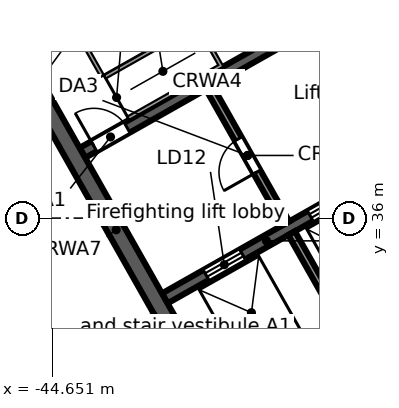
"""IFC4 building model, lengths in metres.
Left out: names, types, materials, properties, quantities, classifications, styles, units other than length and angle.
Written with IfcOpenShell. Run it as: python <this file> out.ifc"""

import sys

from ifc_helpers import new_model, si_unit, direction, frame, frame_2d, origin, place, context, subcontext, project, spatial, rectangle, extrude, element, fill, save


model = new_model("IFC4")
c1 = context("Model", 3, precision=1e-05, world=origin(), true_north=direction((0.0, 1.0)))
c2 = subcontext(c1, "Body", "Model", "MODEL_VIEW")
j1 = project(units=[si_unit("LENGTHUNIT", "METRE"), si_unit("PLANEANGLEUNIT", "RADIAN")], contexts=[c1])
p1 = place(None, origin())
s1 = spatial("IfcSite", under=j1, at=p1, CompositionType="ELEMENT")
p2 = place(p1, origin())
s2 = spatial("IfcBuilding", under=s1, at=p2, CompositionType="ELEMENT")
p3 = place(p2, frame((0.0, 0.0, 227.0)))
s3 = spatial("IfcBuildingStorey", under=s2, at=p3, CompositionType="ELEMENT", Elevation=227.0)
p4 = place(p3, frame((-0.046, 47.974, 0.0), z_axis=(0.0, 0.0, 1.0), x_axis=(-0.870356579543, -0.492421998337, 0.0)))
e1 = element("IfcWall", 1, at=p4, inside=s3, PredefinedType="STANDARD", context=c2, shape_type="SweptSolid", body=[
    extrude(rectangle(XDim=43.754, YDim=0.25, at=frame_2d((21.877, 0.0))), origin(), (0.0, 0.0, 1.0), 3.55),
])
p5 = place(p4, frame((41.061, 0.0, 0.8)))
e2 = element("IfcOpeningElement", 2, at=p5, cuts=e1, PredefinedType="OPENING", context=c2, shape_type="SweptSolid", body=[
    extrude(rectangle(XDim=2.4, YDim=2.2, at=frame_2d((1.2, 1.1))), frame((0.0, 0.135, 0.0), z_axis=(0.0, -1.0, 0.0), x_axis=(1.0, 0.0, 0.0)), (0.0, 0.0, 1.0), 0.27),
])
p6 = place(p4, frame((38.443, 0.0, 0.0)))
e3 = element("IfcOpeningElement", 3, at=p6, cuts=e1, PredefinedType="OPENING", context=c2, shape_type="SweptSolid", body=[
    extrude(rectangle(XDim=1.8, YDim=2.4, at=frame_2d((0.9, 1.2))), frame((0.0, 0.135, 0.0), z_axis=(0.0, -1.0, 0.0), x_axis=(1.0, 0.0, 0.0)), (0.0, 0.0, 1.0), 0.27),
])
p7 = place(p4, frame((35.225, 0.0, 0.8)))
e4 = element("IfcOpeningElement", 4, at=p7, cuts=e1, PredefinedType="OPENING", context=c2, shape_type="SweptSolid", body=[
    extrude(rectangle(XDim=2.4, YDim=2.2, at=frame_2d((1.2, 1.1))), frame((0.0, 0.135, 0.0), z_axis=(0.0, -1.0, 0.0), x_axis=(1.0, 0.0, 0.0)), (0.0, 0.0, 1.0), 0.27),
])
p8 = place(p4, frame((32.307, 0.0, 0.8)))
e5 = element("IfcOpeningElement", 5, at=p8, cuts=e1, PredefinedType="OPENING", context=c2, shape_type="SweptSolid", body=[
    extrude(rectangle(XDim=2.4, YDim=2.2, at=frame_2d((1.2, 1.1))), frame((0.0, 0.135, 0.0), z_axis=(0.0, -1.0, 0.0), x_axis=(1.0, 0.0, 0.0)), (0.0, 0.0, 1.0), 0.27),
])
p9 = place(p4, frame((29.688, 0.0, 0.0)))
e6 = element("IfcOpeningElement", 6, at=p9, cuts=e1, PredefinedType="OPENING", context=c2, shape_type="SweptSolid", body=[
    extrude(rectangle(XDim=1.8, YDim=2.4, at=frame_2d((0.9, 1.2))), frame((0.0, 0.135, 0.0), z_axis=(0.0, -1.0, 0.0), x_axis=(1.0, 0.0, 0.0)), (0.0, 0.0, 1.0), 0.27),
])
p10 = place(p4, frame((26.47, 0.0, 0.8)))
e7 = element("IfcOpeningElement", 7, at=p10, cuts=e1, PredefinedType="OPENING", context=c2, shape_type="SweptSolid", body=[
    extrude(rectangle(XDim=2.4, YDim=2.2, at=frame_2d((1.2, 1.1))), frame((0.0, 0.135, 0.0), z_axis=(0.0, -1.0, 0.0), x_axis=(1.0, 0.0, 0.0)), (0.0, 0.0, 1.0), 0.27),
])
p11 = place(p4, frame((23.552, 0.0, 0.8)))
e8 = element("IfcOpeningElement", 8, at=p11, cuts=e1, PredefinedType="OPENING", context=c2, shape_type="SweptSolid", body=[
    extrude(rectangle(XDim=2.4, YDim=2.2, at=frame_2d((1.2, 1.1))), frame((0.0, 0.135, 0.0), z_axis=(0.0, -1.0, 0.0), x_axis=(1.0, 0.0, 0.0)), (0.0, 0.0, 1.0), 0.27),
])
p12 = place(p4, frame((20.934, 0.0, 0.0)))
e9 = element("IfcOpeningElement", 9, at=p12, cuts=e1, PredefinedType="OPENING", context=c2, shape_type="SweptSolid", body=[
    extrude(rectangle(XDim=1.8, YDim=2.4, at=frame_2d((0.9, 1.2))), frame((0.0, 0.135, 0.0), z_axis=(0.0, -1.0, 0.0), x_axis=(1.0, 0.0, 0.0)), (0.0, 0.0, 1.0), 0.27),
])
p13 = place(p4, frame((17.716, 0.0, 0.8)))
e10 = element("IfcOpeningElement", 10, at=p13, cuts=e1, PredefinedType="OPENING", context=c2, shape_type="SweptSolid", body=[
    extrude(rectangle(XDim=2.4, YDim=2.2, at=frame_2d((1.2, 1.1))), frame((0.0, 0.135, 0.0), z_axis=(0.0, -1.0, 0.0), x_axis=(1.0, 0.0, 0.0)), (0.0, 0.0, 1.0), 0.27),
])
p14 = place(p4, frame((14.798, 0.0, 0.8)))
e11 = element("IfcOpeningElement", 11, at=p14, cuts=e1, PredefinedType="OPENING", context=c2, shape_type="SweptSolid", body=[
    extrude(rectangle(XDim=2.4, YDim=2.2, at=frame_2d((1.2, 1.1))), frame((0.0, 0.135, 0.0), z_axis=(0.0, -1.0, 0.0), x_axis=(1.0, 0.0, 0.0)), (0.0, 0.0, 1.0), 0.27),
])
p15 = place(p4, frame((12.179, 0.0, 0.0)))
e12 = element("IfcOpeningElement", 12, at=p15, cuts=e1, PredefinedType="OPENING", context=c2, shape_type="SweptSolid", body=[
    extrude(rectangle(XDim=1.8, YDim=2.4, at=frame_2d((0.9, 1.2))), frame((0.0, 0.135, 0.0), z_axis=(0.0, -1.0, 0.0), x_axis=(1.0, 0.0, 0.0)), (0.0, 0.0, 1.0), 0.27),
])
p16 = place(p4, frame((8.961, 0.0, 0.8)))
e13 = element("IfcOpeningElement", 13, at=p16, cuts=e1, PredefinedType="OPENING", context=c2, shape_type="SweptSolid", body=[
    extrude(rectangle(XDim=2.4, YDim=2.2, at=frame_2d((1.2, 1.1))), frame((0.0, 0.135, 0.0), z_axis=(0.0, -1.0, 0.0), x_axis=(1.0, 0.0, 0.0)), (0.0, 0.0, 1.0), 0.27),
])
p17 = place(p4, frame((6.043, 0.0, 0.8)))
e14 = element("IfcOpeningElement", 14, at=p17, cuts=e1, PredefinedType="OPENING", context=c2, shape_type="SweptSolid", body=[
    extrude(rectangle(XDim=2.4, YDim=2.2, at=frame_2d((1.2, 1.1))), frame((0.0, 0.135, 0.0), z_axis=(0.0, -1.0, 0.0), x_axis=(1.0, 0.0, 0.0)), (0.0, 0.0, 1.0), 0.27),
])
p18 = place(p4, frame((3.425, 0.0, 0.0)))
e15 = element("IfcOpeningElement", 15, at=p18, cuts=e1, PredefinedType="OPENING", context=c2, shape_type="SweptSolid", body=[
    extrude(rectangle(XDim=1.8, YDim=2.4, at=frame_2d((0.9, 1.2))), frame((0.0, 0.135, 0.0), z_axis=(0.0, -1.0, 0.0), x_axis=(1.0, 0.0, 0.0)), (0.0, 0.0, 1.0), 0.27),
])
p19 = place(p4, frame((0.207, 0.0, 0.8)))
e16 = element("IfcOpeningElement", 16, at=p19, cuts=e1, PredefinedType="OPENING", context=c2, shape_type="SweptSolid", body=[
    extrude(rectangle(XDim=2.4, YDim=2.2, at=frame_2d((1.2, 1.1))), frame((0.0, 0.135, 0.0), z_axis=(0.0, -1.0, 0.0), x_axis=(1.0, 0.0, 0.0)), (0.0, 0.0, 1.0), 0.27),
])
p20 = place(p3, frame((-58.732, 38.771, 0.0), z_axis=(0.0, 0.0, 1.0), x_axis=(0.870354824205, 0.492425100887, 0.0)))
e17 = element("IfcWall", 17, at=p20, inside=s3, PredefinedType="STANDARD", context=c2, shape_type="SweptSolid", body=[
    extrude(rectangle(XDim=64.006, YDim=0.25, at=frame_2d((32.003, 0.0))), origin(), (0.0, 0.0, 1.0), 3.55),
])
p21 = place(p20, frame((61.259, 0.0, 0.8)))
e18 = element("IfcOpeningElement", 18, at=p21, cuts=e17, PredefinedType="OPENING", context=c2, shape_type="SweptSolid", body=[
    extrude(rectangle(XDim=2.4, YDim=2.2, at=frame_2d((1.2, 1.1))), frame((0.0, 0.135, 0.0), z_axis=(0.0, -1.0, 0.0), x_axis=(1.0, 0.0, 0.0)), (0.0, 0.0, 1.0), 0.27),
])
p22 = place(p20, frame((58.216, 0.0, 0.8)))
e19 = element("IfcOpeningElement", 19, at=p22, cuts=e17, PredefinedType="OPENING", context=c2, shape_type="SweptSolid", body=[
    extrude(rectangle(XDim=2.4, YDim=2.2, at=frame_2d((1.2, 1.1))), frame((0.0, 0.135, 0.0), z_axis=(0.0, -1.0, 0.0), x_axis=(1.0, 0.0, 0.0)), (0.0, 0.0, 1.0), 0.27),
])
p23 = place(p20, frame((55.173, 0.0, 0.8)))
e20 = element("IfcOpeningElement", 20, at=p23, cuts=e17, PredefinedType="OPENING", context=c2, shape_type="SweptSolid", body=[
    extrude(rectangle(XDim=2.4, YDim=2.2, at=frame_2d((1.2, 1.1))), frame((0.0, 0.135, 0.0), z_axis=(0.0, -1.0, 0.0), x_axis=(1.0, 0.0, 0.0)), (0.0, 0.0, 1.0), 0.27),
])
p24 = place(p20, frame((52.129, 0.0, 0.8)))
e21 = element("IfcOpeningElement", 21, at=p24, cuts=e17, PredefinedType="OPENING", context=c2, shape_type="SweptSolid", body=[
    extrude(rectangle(XDim=2.4, YDim=2.2, at=frame_2d((1.2, 1.1))), frame((0.0, 0.135, 0.0), z_axis=(0.0, -1.0, 0.0), x_axis=(1.0, 0.0, 0.0)), (0.0, 0.0, 1.0), 0.27),
])
p25 = place(p20, frame((49.086, 0.0, 0.8)))
e22 = element("IfcOpeningElement", 22, at=p25, cuts=e17, PredefinedType="OPENING", context=c2, shape_type="SweptSolid", body=[
    extrude(rectangle(XDim=2.4, YDim=2.2, at=frame_2d((1.2, 1.1))), frame((0.0, 0.135, 0.0), z_axis=(0.0, -1.0, 0.0), x_axis=(1.0, 0.0, 0.0)), (0.0, 0.0, 1.0), 0.27),
])
p26 = place(p20, frame((46.043, 0.0, 0.8)))
e23 = element("IfcOpeningElement", 23, at=p26, cuts=e17, PredefinedType="OPENING", context=c2, shape_type="SweptSolid", body=[
    extrude(rectangle(XDim=2.4, YDim=2.2, at=frame_2d((1.2, 1.1))), frame((0.0, 0.135, 0.0), z_axis=(0.0, -1.0, 0.0), x_axis=(1.0, 0.0, 0.0)), (0.0, 0.0, 1.0), 0.27),
])
p27 = place(p20, frame((43.0, 0.0, 0.8)))
e24 = element("IfcOpeningElement", 24, at=p27, cuts=e17, PredefinedType="OPENING", context=c2, shape_type="SweptSolid", body=[
    extrude(rectangle(XDim=2.4, YDim=2.2, at=frame_2d((1.2, 1.1))), frame((0.0, 0.135, 0.0), z_axis=(0.0, -1.0, 0.0), x_axis=(1.0, 0.0, 0.0)), (0.0, 0.0, 1.0), 0.27),
])
p28 = place(p20, frame((39.956, 0.0, 0.8)))
e25 = element("IfcOpeningElement", 25, at=p28, cuts=e17, PredefinedType="OPENING", context=c2, shape_type="SweptSolid", body=[
    extrude(rectangle(XDim=2.4, YDim=2.2, at=frame_2d((1.2, 1.1))), frame((0.0, 0.135, 0.0), z_axis=(0.0, -1.0, 0.0), x_axis=(1.0, 0.0, 0.0)), (0.0, 0.0, 1.0), 0.27),
])
p29 = place(p20, frame((36.913, 0.0, 0.8)))
e26 = element("IfcOpeningElement", 26, at=p29, cuts=e17, PredefinedType="OPENING", context=c2, shape_type="SweptSolid", body=[
    extrude(rectangle(XDim=2.4, YDim=2.2, at=frame_2d((1.2, 1.1))), frame((0.0, 0.135, 0.0), z_axis=(0.0, -1.0, 0.0), x_axis=(1.0, 0.0, 0.0)), (0.0, 0.0, 1.0), 0.27),
])
p30 = place(p20, frame((33.87, 0.0, 0.8)))
e27 = element("IfcOpeningElement", 27, at=p30, cuts=e17, PredefinedType="OPENING", context=c2, shape_type="SweptSolid", body=[
    extrude(rectangle(XDim=2.4, YDim=2.2, at=frame_2d((1.2, 1.1))), frame((0.0, 0.135, 0.0), z_axis=(0.0, -1.0, 0.0), x_axis=(1.0, 0.0, 0.0)), (0.0, 0.0, 1.0), 0.27),
])
p31 = place(p20, frame((30.826, 0.0, 0.8)))
e28 = element("IfcOpeningElement", 28, at=p31, cuts=e17, PredefinedType="OPENING", context=c2, shape_type="SweptSolid", body=[
    extrude(rectangle(XDim=2.4, YDim=2.2, at=frame_2d((1.2, 1.1))), frame((0.0, 0.135, 0.0), z_axis=(0.0, -1.0, 0.0), x_axis=(1.0, 0.0, 0.0)), (0.0, 0.0, 1.0), 0.27),
])
p32 = place(p20, frame((27.783, 0.0, 0.8)))
e29 = element("IfcOpeningElement", 29, at=p32, cuts=e17, PredefinedType="OPENING", context=c2, shape_type="SweptSolid", body=[
    extrude(rectangle(XDim=2.4, YDim=2.2, at=frame_2d((1.2, 1.1))), frame((0.0, 0.135, 0.0), z_axis=(0.0, -1.0, 0.0), x_axis=(1.0, 0.0, 0.0)), (0.0, 0.0, 1.0), 0.27),
])
p33 = place(p20, frame((24.74, 0.0, 0.8)))
e30 = element("IfcOpeningElement", 30, at=p33, cuts=e17, PredefinedType="OPENING", context=c2, shape_type="SweptSolid", body=[
    extrude(rectangle(XDim=2.4, YDim=2.2, at=frame_2d((1.2, 1.1))), frame((0.0, 0.135, 0.0), z_axis=(0.0, -1.0, 0.0), x_axis=(1.0, 0.0, 0.0)), (0.0, 0.0, 1.0), 0.27),
])
p34 = place(p20, frame((21.696, 0.0, 0.8)))
e31 = element("IfcOpeningElement", 31, at=p34, cuts=e17, PredefinedType="OPENING", context=c2, shape_type="SweptSolid", body=[
    extrude(rectangle(XDim=2.4, YDim=2.2, at=frame_2d((1.2, 1.1))), frame((0.0, 0.135, 0.0), z_axis=(0.0, -1.0, 0.0), x_axis=(1.0, 0.0, 0.0)), (0.0, 0.0, 1.0), 0.27),
])
p35 = place(p20, frame((18.653, 0.0, 0.8)))
e32 = element("IfcOpeningElement", 32, at=p35, cuts=e17, PredefinedType="OPENING", context=c2, shape_type="SweptSolid", body=[
    extrude(rectangle(XDim=2.4, YDim=2.2, at=frame_2d((1.2, 1.1))), frame((0.0, 0.135, 0.0), z_axis=(0.0, -1.0, 0.0), x_axis=(1.0, 0.0, 0.0)), (0.0, 0.0, 1.0), 0.27),
])
p36 = place(p20, frame((15.61, 0.0, 0.8)))
e33 = element("IfcOpeningElement", 33, at=p36, cuts=e17, PredefinedType="OPENING", context=c2, shape_type="SweptSolid", body=[
    extrude(rectangle(XDim=2.4, YDim=2.2, at=frame_2d((1.2, 1.1))), frame((0.0, 0.135, 0.0), z_axis=(0.0, -1.0, 0.0), x_axis=(1.0, 0.0, 0.0)), (0.0, 0.0, 1.0), 0.27),
])
p37 = place(p20, frame((12.567, 0.0, 0.8)))
e34 = element("IfcOpeningElement", 34, at=p37, cuts=e17, PredefinedType="OPENING", context=c2, shape_type="SweptSolid", body=[
    extrude(rectangle(XDim=2.4, YDim=2.2, at=frame_2d((1.2, 1.1))), frame((0.0, 0.135, 0.0), z_axis=(0.0, -1.0, 0.0), x_axis=(1.0, 0.0, 0.0)), (0.0, 0.0, 1.0), 0.27),
])
p38 = place(p20, frame((9.523, 0.0, 0.8)))
e35 = element("IfcOpeningElement", 35, at=p38, cuts=e17, PredefinedType="OPENING", context=c2, shape_type="SweptSolid", body=[
    extrude(rectangle(XDim=2.4, YDim=2.2, at=frame_2d((1.2, 1.1))), frame((0.0, 0.135, 0.0), z_axis=(0.0, -1.0, 0.0), x_axis=(1.0, 0.0, 0.0)), (0.0, 0.0, 1.0), 0.27),
])
p39 = place(p20, frame((6.48, 0.0, 0.8)))
e36 = element("IfcOpeningElement", 36, at=p39, cuts=e17, PredefinedType="OPENING", context=c2, shape_type="SweptSolid", body=[
    extrude(rectangle(XDim=2.4, YDim=2.2, at=frame_2d((1.2, 1.1))), frame((0.0, 0.135, 0.0), z_axis=(0.0, -1.0, 0.0), x_axis=(1.0, 0.0, 0.0)), (0.0, 0.0, 1.0), 0.27),
])
p40 = place(p20, frame((3.437, 0.0, 0.8)))
e37 = element("IfcOpeningElement", 37, at=p40, cuts=e17, PredefinedType="OPENING", context=c2, shape_type="SweptSolid", body=[
    extrude(rectangle(XDim=2.4, YDim=2.2, at=frame_2d((1.2, 1.1))), frame((0.0, 0.135, 0.0), z_axis=(0.0, -1.0, 0.0), x_axis=(1.0, 0.0, 0.0)), (0.0, 0.0, 1.0), 0.27),
])
p41 = place(p20, frame((0.393, 0.0, 0.8)))
e38 = element("IfcOpeningElement", 38, at=p41, cuts=e17, PredefinedType="OPENING", context=c2, shape_type="SweptSolid", body=[
    extrude(rectangle(XDim=2.4, YDim=2.2, at=frame_2d((1.2, 1.1))), frame((0.0, 0.135, 0.0), z_axis=(0.0, -1.0, 0.0), x_axis=(1.0, 0.0, 0.0)), (0.0, 0.0, 1.0), 0.27),
])
p42 = place(p3, frame((-44.115, 26.507, 0.0), z_axis=(0.0, 0.0, 1.0), x_axis=(-0.857166583633, 0.515039268311, 0.0)))
e39 = element("IfcWall", 39, at=p42, inside=s3, PredefinedType="STANDARD", context=c2, shape_type="SweptSolid", body=[
    extrude(rectangle(XDim=17.106, YDim=0.25, at=frame_2d((8.553, 0.0))), origin(), (0.0, 0.0, 1.0), 3.55),
])
p43 = place(p42, frame((14.417, 0.0, 0.8)))
e40 = element("IfcOpeningElement", 40, at=p43, cuts=e39, PredefinedType="OPENING", context=c2, shape_type="SweptSolid", body=[
    extrude(rectangle(XDim=2.4, YDim=2.2, at=frame_2d((1.2, 1.1))), frame((0.0, 0.135, 0.0), z_axis=(0.0, -1.0, 0.0), x_axis=(1.0, 0.0, 0.0)), (0.0, 0.0, 1.0), 0.27),
])
p44 = place(p42, frame((11.584, 0.0, 0.8)))
e41 = element("IfcOpeningElement", 41, at=p44, cuts=e39, PredefinedType="OPENING", context=c2, shape_type="SweptSolid", body=[
    extrude(rectangle(XDim=2.4, YDim=2.2, at=frame_2d((1.2, 1.1))), frame((0.0, 0.135, 0.0), z_axis=(0.0, -1.0, 0.0), x_axis=(1.0, 0.0, 0.0)), (0.0, 0.0, 1.0), 0.27),
])
p45 = place(p42, frame((8.75, 0.0, 0.8)))
e42 = element("IfcOpeningElement", 42, at=p45, cuts=e39, PredefinedType="OPENING", context=c2, shape_type="SweptSolid", body=[
    extrude(rectangle(XDim=2.4, YDim=2.2, at=frame_2d((1.2, 1.1))), frame((0.0, 0.135, 0.0), z_axis=(0.0, -1.0, 0.0), x_axis=(1.0, 0.0, 0.0)), (0.0, 0.0, 1.0), 0.27),
])
p46 = place(p42, frame((5.917, 0.0, 0.8)))
e43 = element("IfcOpeningElement", 43, at=p46, cuts=e39, PredefinedType="OPENING", context=c2, shape_type="SweptSolid", body=[
    extrude(rectangle(XDim=2.4, YDim=2.2, at=frame_2d((1.2, 1.1))), frame((0.0, 0.135, 0.0), z_axis=(0.0, -1.0, 0.0), x_axis=(1.0, 0.0, 0.0)), (0.0, 0.0, 1.0), 0.27),
])
p47 = place(p42, frame((3.084, 0.0, 0.8)))
e44 = element("IfcOpeningElement", 44, at=p47, cuts=e39, PredefinedType="OPENING", context=c2, shape_type="SweptSolid", body=[
    extrude(rectangle(XDim=2.4, YDim=2.2, at=frame_2d((1.2, 1.1))), frame((0.0, 0.135, 0.0), z_axis=(0.0, -1.0, 0.0), x_axis=(1.0, 0.0, 0.0)), (0.0, 0.0, 1.0), 0.27),
])
p48 = place(p42, frame((0.25, 0.0, 0.8)))
e45 = element("IfcOpeningElement", 45, at=p48, cuts=e39, PredefinedType="OPENING", context=c2, shape_type="SweptSolid", body=[
    extrude(rectangle(XDim=2.4, YDim=2.2, at=frame_2d((1.2, 1.1))), frame((0.0, 0.135, 0.0), z_axis=(0.0, -1.0, 0.0), x_axis=(1.0, 0.0, 0.0)), (0.0, 0.0, 1.0), 0.27),
])
p49 = place(p3, frame((-39.825, 29.684, 0.0), z_axis=(0.0, 0.0, 1.0), x_axis=(0.870353598469, 0.492427267353, 0.0)))
e46 = element("IfcWall", 46, at=p49, inside=s3, PredefinedType="SOLIDWALL", context=c2, shape_type="SweptSolid", body=[
    extrude(rectangle(XDim=17.0, YDim=0.45, at=frame_2d((8.5, 0.0))), origin(), (0.0, 0.0, 1.0), 3.55),
])
p50 = place(p49, frame((7.2, 0.0, 0.0)))
e47 = element("IfcOpeningElement", 47, at=p50, cuts=e46, PredefinedType="OPENING", context=c2, shape_type="SweptSolid", body=[
    extrude(rectangle(XDim=1.2, YDim=2.1, at=frame_2d((0.6, 1.05))), frame((0.0, 0.235, 0.0), z_axis=(0.0, -1.0, 0.0), x_axis=(1.0, 0.0, 0.0)), (0.0, 0.0, 1.0), 0.47),
])
p51 = place(p3, frame((-41.687, 33.887, 0.0), z_axis=(0.0, 0.0, 1.0), x_axis=(0.870355736587, 0.49242348826, 0.0)))
e48 = element("IfcWall", 48, at=p51, inside=s3, PredefinedType="SOLIDWALL", context=c2, shape_type="SweptSolid", body=[
    extrude(rectangle(XDim=6.15, YDim=0.3, at=frame_2d((3.075, 0.0))), origin(), (0.0, 0.0, 1.0), 3.55),
])
p52 = place(p51, frame((1.25, 0.0, 0.0)))
e49 = element("IfcOpeningElement", 49, at=p52, cuts=e48, PredefinedType="OPENING", context=c2, shape_type="SweptSolid", body=[
    extrude(rectangle(XDim=1.1, YDim=2.1, at=frame_2d((0.55, 1.05))), frame((0.0, 0.16, 0.0), z_axis=(0.0, -1.0, 0.0), x_axis=(1.0, 0.0, 0.0)), (0.0, 0.0, 1.0), 0.32),
])
p53 = place(p51, frame((4.4, 0.0, 0.0)))
e50 = element("IfcOpeningElement", 50, at=p53, cuts=e48, PredefinedType="OPENING", context=c2, shape_type="SweptSolid", body=[
    extrude(rectangle(XDim=1.1, YDim=2.1, at=frame_2d((0.55, 1.05))), frame((0.0, 0.16, 0.0), z_axis=(0.0, -1.0, 0.0), x_axis=(1.0, 0.0, 0.0)), (0.0, 0.0, 1.0), 0.32),
])
p54 = place(p3, frame((-43.853, 37.717, 0.0), z_axis=(0.0, 0.0, 1.0), x_axis=(0.870360409231, 0.492415229297, 0.0)))
e51 = element("IfcWall", 51, at=p54, inside=s3, PredefinedType="SOLIDWALL", context=c2, shape_type="SweptSolid", body=[
    extrude(rectangle(XDim=7.55, YDim=0.3, at=frame_2d((3.775, 0.0))), origin(), (0.0, 0.0, 1.0), 3.55),
])
p55 = place(p54, frame((0.35, 0.0, 0.0)))
e52 = element("IfcOpeningElement", 52, at=p55, cuts=e51, PredefinedType="OPENING", context=c2, shape_type="SweptSolid", body=[
    extrude(rectangle(XDim=1.0, YDim=2.1, at=frame_2d((0.5, 1.05))), frame((0.0, 0.16, 0.0), z_axis=(0.0, -1.0, 0.0), x_axis=(1.0, 0.0, 0.0)), (0.0, 0.0, 1.0), 0.32),
])
p56 = place(p3, frame((-46.191, 41.392, 0.0), z_axis=(0.0, 0.0, 1.0), x_axis=(0.492421378713, -0.870356930107, 0.0)))
e53 = element("IfcWall", 53, at=p56, inside=s3, PredefinedType="SOLIDWALL", context=c2, shape_type="SweptSolid", body=[
    extrude(rectangle(XDim=13.1, YDim=0.45, at=frame_2d((6.55, 0.0))), origin(), (0.0, 0.0, 1.0), 3.55),
])
p57 = place(p3, frame((-38.349, 35.603, 0.0), z_axis=(0.0, 0.0, 1.0), x_axis=(0.492409653846, -0.870363563575, 0.0)))
e54 = element("IfcWall", 54, at=p57, inside=s3, PredefinedType="SOLIDWALL", context=c2, shape_type="SweptSolid", body=[
    extrude(rectangle(XDim=4.2, YDim=0.2, at=frame_2d((2.1, 0.0))), origin(), (0.0, 0.0, 1.0), 3.55),
])
p58 = place(p3, frame((-40.516, 39.433, 0.0), z_axis=(0.0, 0.0, 1.0), x_axis=(0.492453559952, -0.87033872216, 0.0)))
e55 = element("IfcWall", 55, at=p58, inside=s3, PredefinedType="PARTITIONING", context=c2, shape_type="SweptSolid", body=[
    extrude(rectangle(XDim=4.1, YDim=0.2, at=frame_2d((2.05, 0.0))), origin(), (0.0, 0.0, 1.0), 3.55),
])
p59 = place(p58, frame((1.55, 0.0, 0.0)))
e56 = element("IfcOpeningElement", 56, at=p59, cuts=e55, PredefinedType="OPENING", context=c2, shape_type="SweptSolid", body=[
    extrude(rectangle(XDim=1.0, YDim=2.1, at=frame_2d((0.5, 1.05))), frame((0.0, 0.11, 0.0), z_axis=(0.0, -1.0, 0.0), x_axis=(1.0, 0.0, 0.0)), (0.0, 0.0, 1.0), 0.22),
])
p60 = place(p3, frame((-46.935, 30.573, 0.0), z_axis=(0.0, 0.0, 1.0), x_axis=(0.870367427407, 0.492402824229, 0.0)))
e57 = element("IfcWall", 57, at=p60, inside=s3, PredefinedType="PARTITIONING", context=c2, shape_type="SweptSolid", body=[
    extrude(rectangle(XDim=5.75, YDim=0.125, at=frame_2d((2.875, 0.0))), origin(), (0.0, 0.0, 1.0), 3.55),
])
p61 = place(p60, frame((2.45, 0.0, 0.0)))
e58 = element("IfcOpeningElement", 58, at=p61, cuts=e57, PredefinedType="OPENING", context=c2, shape_type="SweptSolid", body=[
    extrude(rectangle(XDim=0.9, YDim=2.1, at=frame_2d((0.45, 1.05))), frame((0.0, 0.073, 0.0), z_axis=(0.0, -1.0, 0.0), x_axis=(1.0, 0.0, 0.0)), (0.0, 0.0, 1.0), 0.145),
])
p62 = place(p52, origin())
e59 = element("IfcDoor", 59, at=p62, inside=s3, OperationType="DOUBLE_DOOR_SLIDING", PredefinedType="DOOR", context=c2, shape_type="SweptSolid", body=[
    extrude(rectangle(XDim=1.1, YDim=2.1, at=frame_2d((0.55, 1.05))), frame((0.0, 0.025, 0.0), z_axis=(0.0, -1.0, 0.0), x_axis=(1.0, 0.0, 0.0)), (0.0, 0.0, 1.0), 0.05),
])
fill(e49, e59)
p63 = place(p53, origin())
e60 = element("IfcDoor", 60, at=p63, inside=s3, OperationType="DOUBLE_DOOR_SLIDING", PredefinedType="DOOR", context=c2, shape_type="SweptSolid", body=[
    extrude(rectangle(XDim=1.1, YDim=2.1, at=frame_2d((0.55, 1.05))), frame((0.0, 0.025, 0.0), z_axis=(0.0, -1.0, 0.0), x_axis=(1.0, 0.0, 0.0)), (0.0, 0.0, 1.0), 0.05),
])
fill(e50, e60)
p64 = place(p55, origin())
e61 = element("IfcDoor", 61, at=p64, inside=s3, OperationType="SINGLE_SWING_LEFT", PredefinedType="DOOR", context=c2, shape_type="SweptSolid", body=[
    extrude(rectangle(XDim=1.0, YDim=2.1, at=frame_2d((0.5, 1.05))), frame((0.0, 0.025, 0.0), z_axis=(0.0, -1.0, 0.0), x_axis=(1.0, 0.0, 0.0)), (0.0, 0.0, 1.0), 0.05),
])
fill(e52, e61)
p65 = place(p59, frame((1.0, 0.0, 0.0), z_axis=(0.0, 0.0, 1.0), x_axis=(-1.0, 0.0, 0.0)))
e62 = element("IfcDoor", 62, at=p65, inside=s3, OperationType="SINGLE_SWING_LEFT", PredefinedType="DOOR", context=c2, shape_type="SweptSolid", body=[
    extrude(rectangle(XDim=1.0, YDim=2.1, at=frame_2d((0.5, 1.05))), frame((0.0, 0.025, 0.0), z_axis=(0.0, -1.0, 0.0), x_axis=(1.0, 0.0, 0.0)), (0.0, 0.0, 1.0), 0.05),
])
fill(e56, e62)
save(model, sys.argv[1])
